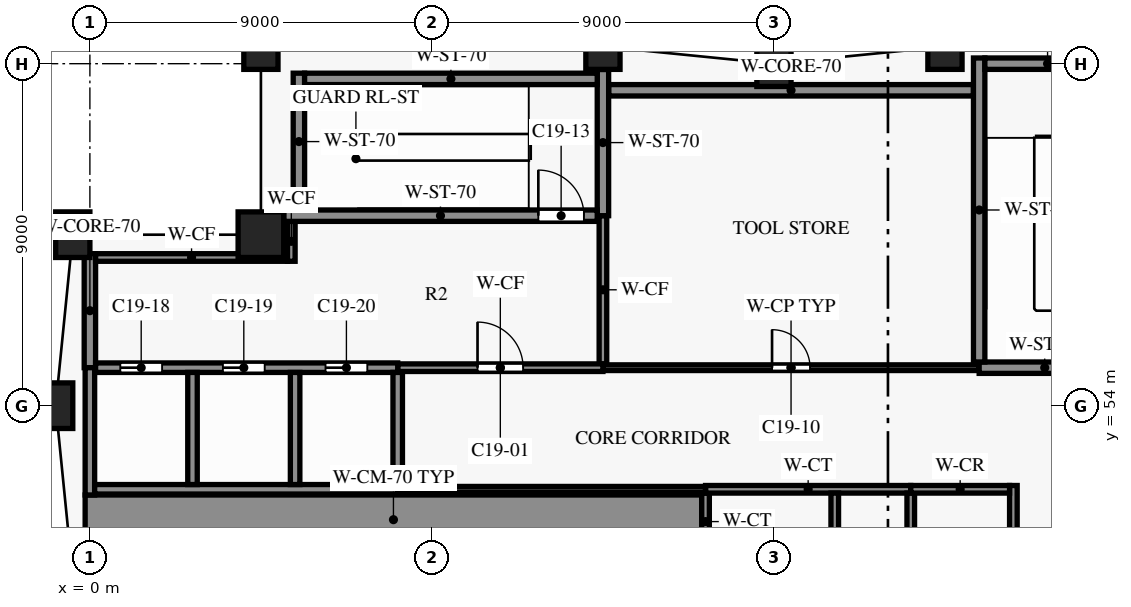
"""IFC4 building model, lengths in metres.
Left out: names, types, materials, properties, quantities, classifications, styles, units other than length and angle.
Written with IfcOpenShell. Run it as: python <this file> out.ifc"""

import sys

from ifc_helpers import new_model, si_unit, direction, frame, frame_2d, origin, origin_2d, place, context, subcontext, project, spatial, rectangle, extrude, element, fill, save


model = new_model("IFC4")
c1 = context("Model", 3, precision=1e-05, world=origin(), true_north=direction((0.0, 1.0)))
c2 = subcontext(c1, "Body", "Model", "MODEL_VIEW")
j1 = project(units=[si_unit("LENGTHUNIT", "METRE"), si_unit("PLANEANGLEUNIT", "RADIAN")], contexts=[c1])
p1 = place(None, origin())
s1 = spatial("IfcSite", under=j1, at=p1, CompositionType="ELEMENT")
p2 = place(p1, origin())
s2 = spatial("IfcBuilding", under=s1, at=p2, CompositionType="ELEMENT")
p3 = place(p2, frame((0.0, 0.0, 137.9)))
s3 = spatial("IfcBuildingStorey", under=s2, at=p3, CompositionType="ELEMENT", Elevation=137.9)
for number, where, z_axis, x_axis in (
    (1, (22.5, 63.45, 0.0), (0.0, 0.0, 1.0), (-0.995, -0.1, 0.0)),
    (2, (18.0, 63.0, 0.0), (0.0, 0.0, 1.0), (-1.0, 0.0, 0.0)),
    (3, (13.5, 63.45, 0.0), (0.0, 0.0, 1.0), (-0.995, 0.1, 0.0)),
    (4, (9.0, 63.9, 0.0), (0.0, 0.0, 1.0), (-1.0, 0.0, 0.0)),
    (5, (4.5, 63.45, 0.0), (0.0, 0.0, 1.0), (-0.995, -0.1, 0.0)),
    (6, (-0.45, 58.5, 0.0), (0.0, 0.0, 1.0), (-0.1, -0.995, 0.0)),
    (7, (-0.9, 54.0, 0.0), (0.0, 0.0, 1.0), (0.0, -1.0, 0.0)),
):
    element("IfcColumn", number, at=place(p3, frame(where, z_axis=z_axis, x_axis=x_axis)), inside=s3, PredefinedType="COLUMN", context=c2, shape_type="SweptSolid", body=[
        extrude(rectangle(XDim=0.9, YDim=1.2, at=origin_2d()), origin(), (0.0, 0.0, 1.0), 5.5),
    ])
p4 = place(p3, frame((4.5, 58.5, 0.0), z_axis=(0.0, 0.0, 1.0), x_axis=(1.0, 0.0, 0.0)))
e8 = element("IfcColumn", 8, at=p4, inside=s3, PredefinedType="COLUMN", context=c2, shape_type="SweptSolid", body=[
    extrude(rectangle(XDim=1.2, YDim=1.2, at=origin_2d()), origin(), (0.0, 0.0, 1.0), 5.5),
])
p5 = place(p3, frame((-0.125, 51.0, 0.0), z_axis=(0.0, 0.0, 1.0), x_axis=(1.0, 0.0, 0.0)))
e9 = element("IfcWall", 9, at=p5, inside=s3, PredefinedType="SHEAR", context=c2, shape_type="SweptSolid", body=[
    extrude(rectangle(XDim=16.225, YDim=1.3, at=frame_2d((8.113, 0.0))), origin(), (0.0, 0.0, 1.0), 5.2),
])
p6 = place(p3, frame((8.1, 51.8, 0.0), z_axis=(0.0, 0.0, 1.0), x_axis=(1.0, 0.0, 0.0)))
e10 = element("IfcWall", 10, at=p6, inside=s3, PredefinedType="PARTITIONING", context=c2, shape_type="SweptSolid", body=[
    extrude(rectangle(XDim=8.1, YDim=0.15, at=frame_2d((4.05, 0.0))), origin(), (0.0, 0.0, 1.0), 5.2),
])
p7 = place(p3, frame((16.2, 51.8, 0.0), z_axis=(0.0, 0.0, 1.0), x_axis=(1.0, 0.0, 0.0)))
e11 = element("IfcWall", 11, at=p7, inside=s3, PredefinedType="PARTITIONING", context=c2, shape_type="SweptSolid", body=[
    extrude(rectangle(XDim=5.4, YDim=0.2, at=frame_2d((2.7, 0.0))), origin(), (0.0, 0.0, 1.0), 5.2),
])
p8 = place(p3, frame((21.6, 51.8, 0.0), z_axis=(0.0, 0.0, 1.0), x_axis=(1.0, 0.0, 0.0)))
e12 = element("IfcWall", 12, at=p8, inside=s3, PredefinedType="PARTITIONING", context=c2, shape_type="SweptSolid", body=[
    extrude(rectangle(XDim=2.6, YDim=0.2, at=frame_2d((1.3, 0.0))), origin(), (0.0, 0.0, 1.0), 5.2),
])
p9 = place(p3, frame((0.125, 51.8, 0.0), z_axis=(0.0, 0.0, 1.0), x_axis=(1.0, 0.0, 0.0)))
e13 = element("IfcWall", 13, at=p9, inside=s3, PredefinedType="SHEAR", context=c2, shape_type="SweptSolid", body=[
    extrude(rectangle(XDim=7.975, YDim=0.25, at=frame_2d((3.988, 0.0))), origin(), (0.0, 0.0, 1.0), 5.2),
])
p10 = place(p3, frame((8.1, 55.0, 0.0), z_axis=(0.0, 0.0, 1.0), x_axis=(1.0, 0.0, 0.0)))
e14 = element("IfcWall", 14, at=p10, inside=s3, PredefinedType="PARTITIONING", context=c2, shape_type="SweptSolid", body=[
    extrude(rectangle(XDim=5.4, YDim=0.2, at=frame_2d((2.7, 0.0))), origin(), (0.0, 0.0, 1.0), 5.2),
])
p11 = place(p10, frame((2.1, 0.0, 0.0)))
e15 = element("IfcOpeningElement", 15, at=p11, cuts=e14, PredefinedType="OPENING", context=c2, shape_type="SweptSolid", body=[
    extrude(rectangle(XDim=1.2, YDim=2.2, at=frame_2d((0.6, 1.1))), frame((0.0, 0.11, 0.0), z_axis=(0.0, -1.0, 0.0), x_axis=(1.0, 0.0, 0.0)), (0.0, 0.0, 1.0), 0.22),
])
p12 = place(p3, frame((13.5, 55.0, 0.0), z_axis=(0.0, 0.0, 1.0), x_axis=(1.0, 0.0, 0.0)))
e16 = element("IfcWall", 16, at=p12, inside=s3, PredefinedType="PARTITIONING", context=c2, shape_type="SweptSolid", body=[
    extrude(rectangle(XDim=9.9, YDim=0.15, at=frame_2d((4.95, 0.0))), origin(), (0.0, 0.0, 1.0), 5.2),
])
p13 = place(p12, frame((4.45, 0.0, 0.0)))
e17 = element("IfcOpeningElement", 17, at=p13, cuts=e16, PredefinedType="OPENING", context=c2, shape_type="SweptSolid", body=[
    extrude(rectangle(XDim=1.0, YDim=2.1, at=frame_2d((0.5, 1.05))), frame((0.0, 0.085, 0.0), z_axis=(0.0, -1.0, 0.0), x_axis=(1.0, 0.0, 0.0)), (0.0, 0.0, 1.0), 0.17),
])
p14 = place(p3, frame((0.15, 55.0, 0.0), z_axis=(0.0, 0.0, 1.0), x_axis=(1.0, 0.0, 0.0)))
e18 = element("IfcWall", 18, at=p14, inside=s3, PredefinedType="SHEAR", context=c2, shape_type="SweptSolid", body=[
    extrude(rectangle(XDim=7.95, YDim=0.25, at=frame_2d((3.975, 0.0))), origin(), (0.0, 0.0, 1.0), 5.2),
])
p15 = place(p14, frame((0.65, 0.0, 0.0)))
e19 = element("IfcOpeningElement", 19, at=p15, cuts=e18, PredefinedType="OPENING", context=c2, shape_type="SweptSolid", body=[
    extrude(rectangle(XDim=1.1, YDim=2.1, at=frame_2d((0.55, 1.05))), frame((0.0, 0.135, 0.0), z_axis=(0.0, -1.0, 0.0), x_axis=(1.0, 0.0, 0.0)), (0.0, 0.0, 1.0), 0.27),
])
p16 = place(p14, frame((3.35, 0.0, 0.0)))
e20 = element("IfcOpeningElement", 20, at=p16, cuts=e18, PredefinedType="OPENING", context=c2, shape_type="SweptSolid", body=[
    extrude(rectangle(XDim=1.1, YDim=2.1, at=frame_2d((0.55, 1.05))), frame((0.0, 0.135, 0.0), z_axis=(0.0, -1.0, 0.0), x_axis=(1.0, 0.0, 0.0)), (0.0, 0.0, 1.0), 0.27),
])
p17 = place(p14, frame((6.05, 0.0, 0.0)))
e21 = element("IfcOpeningElement", 21, at=p17, cuts=e18, PredefinedType="OPENING", context=c2, shape_type="SweptSolid", body=[
    extrude(rectangle(XDim=1.1, YDim=2.1, at=frame_2d((0.55, 1.05))), frame((0.0, 0.135, 0.0), z_axis=(0.0, -1.0, 0.0), x_axis=(1.0, 0.0, 0.0)), (0.0, 0.0, 1.0), 0.27),
])
p18 = place(p3, frame((23.4, 55.0, 0.0), z_axis=(0.0, 0.0, 1.0), x_axis=(1.0, 0.0, 0.0)))
e22 = element("IfcWall", 22, at=p18, inside=s3, PredefinedType="SHEAR", context=c2, shape_type="SweptSolid", body=[
    extrude(rectangle(XDim=3.45, YDim=0.3, at=frame_2d((1.725, 0.0))), origin(), (0.0, 0.0, 1.0), 5.2),
])
p19 = place(p3, frame((0.15, 57.9, 0.0), z_axis=(0.0, 0.0, 1.0), x_axis=(1.0, 0.0, 0.0)))
e23 = element("IfcWall", 23, at=p19, inside=s3, PredefinedType="PARTITIONING", context=c2, shape_type="SweptSolid", body=[
    extrude(rectangle(XDim=5.05, YDim=0.2, at=frame_2d((2.525, 0.0))), origin(), (0.0, 0.0, 1.0), 5.2),
])
p20 = place(p3, frame((5.1, 59.0, 0.0), z_axis=(0.0, 0.0, 1.0), x_axis=(1.0, 0.0, 0.0)))
e24 = element("IfcWall", 24, at=p20, inside=s3, PredefinedType="SHEAR", context=c2, shape_type="SweptSolid", body=[
    extrude(rectangle(XDim=8.25, YDim=0.3, at=frame_2d((4.125, 0.0))), origin(), (0.0, 0.0, 1.0), 5.2),
])
p21 = place(p20, frame((6.7, 0.0, 0.0)))
e25 = element("IfcOpeningElement", 25, at=p21, cuts=e24, PredefinedType="OPENING", context=c2, shape_type="SweptSolid", body=[
    extrude(rectangle(XDim=1.2, YDim=2.2, at=frame_2d((0.6, 1.1))), frame((0.0, 0.16, 0.0), z_axis=(0.0, -1.0, 0.0), x_axis=(1.0, 0.0, 0.0)), (0.0, 0.0, 1.0), 0.32),
])
p22 = place(p3, frame((13.65, 62.3, 0.0), z_axis=(0.0, 0.0, 1.0), x_axis=(1.0, 0.0, 0.0)))
e26 = element("IfcWall", 26, at=p22, inside=s3, PredefinedType="SHEAR", context=c2, shape_type="SweptSolid", body=[
    extrude(rectangle(XDim=9.6, YDim=0.3, at=frame_2d((4.8, 0.0))), origin(), (0.0, 0.0, 1.0), 5.2),
])
p23 = place(p3, frame((5.65, 62.6, 0.0), z_axis=(0.0, 0.0, 1.0), x_axis=(1.0, 0.0, 0.0)))
e27 = element("IfcWall", 27, at=p23, inside=s3, PredefinedType="SHEAR", context=c2, shape_type="SweptSolid", body=[
    extrude(rectangle(XDim=7.7, YDim=0.3, at=frame_2d((3.85, 0.0))), origin(), (0.0, 0.0, 1.0), 5.2),
])
p24 = place(p3, frame((23.55, 63.0, 0.0), z_axis=(0.0, 0.0, 1.0), x_axis=(1.0, 0.0, 0.0)))
e28 = element("IfcWall", 28, at=p24, inside=s3, PredefinedType="SHEAR", context=c2, shape_type="SweptSolid", body=[
    extrude(rectangle(XDim=3.3, YDim=0.3, at=frame_2d((1.65, 0.0))), origin(), (0.0, 0.0, 1.0), 5.2),
])
p25 = place(p3, frame((0.0, 55.0, 0.0), z_axis=(0.0, 0.0, 1.0), x_axis=(0.0, 1.0, 0.0)))
e29 = element("IfcWall", 29, at=p25, inside=s3, PredefinedType="SHEAR", context=c2, shape_type="SweptSolid", body=[
    extrude(rectangle(XDim=3.0, YDim=0.3, at=frame_2d((1.5, 0.0))), origin(), (0.0, 0.0, 1.0), 5.2),
])
p26 = place(p3, frame((0.0, 51.65, 0.0), z_axis=(0.0, 0.0, 1.0), x_axis=(0.0, 1.0, 0.0)))
e30 = element("IfcWall", 30, at=p26, inside=s3, PredefinedType="SHEAR", context=c2, shape_type="SweptSolid", body=[
    extrude(rectangle(XDim=3.35, YDim=0.25, at=frame_2d((1.675, 0.0))), origin(), (0.0, 0.0, 1.0), 5.2),
])
p27 = place(p3, frame((2.7, 51.925, 0.0), z_axis=(0.0, 0.0, 1.0), x_axis=(0.0, 1.0, 0.0)))
e31 = element("IfcWall", 31, at=p27, inside=s3, PredefinedType="SHEAR", context=c2, shape_type="SweptSolid", body=[
    extrude(rectangle(XDim=2.95, YDim=0.25, at=frame_2d((1.475, 0.0))), origin(), (0.0, 0.0, 1.0), 5.2),
])
p28 = place(p3, frame((5.3, 57.8, 0.0), z_axis=(0.0, 0.0, 1.0), x_axis=(0.0, 1.0, 0.0)))
e32 = element("IfcWall", 32, at=p28, inside=s3, PredefinedType="PARTITIONING", context=c2, shape_type="SweptSolid", body=[
    extrude(rectangle(XDim=1.05, YDim=0.2, at=frame_2d((0.525, 0.0))), origin(), (0.0, 0.0, 1.0), 5.2),
])
p29 = place(p3, frame((5.4, 51.925, 0.0), z_axis=(0.0, 0.0, 1.0), x_axis=(0.0, 1.0, 0.0)))
e33 = element("IfcWall", 33, at=p29, inside=s3, PredefinedType="SHEAR", context=c2, shape_type="SweptSolid", body=[
    extrude(rectangle(XDim=2.95, YDim=0.25, at=frame_2d((1.475, 0.0))), origin(), (0.0, 0.0, 1.0), 5.2),
])
p30 = place(p3, frame((5.5, 59.15, 0.0), z_axis=(0.0, 0.0, 1.0), x_axis=(0.0, 1.0, 0.0)))
e34 = element("IfcWall", 34, at=p30, inside=s3, PredefinedType="SHEAR", context=c2, shape_type="SweptSolid", body=[
    extrude(rectangle(XDim=3.6, YDim=0.3, at=frame_2d((1.8, 0.0))), origin(), (0.0, 0.0, 1.0), 5.2),
])
p31 = place(p3, frame((8.1, 51.925, 0.0), z_axis=(0.0, 0.0, 1.0), x_axis=(0.0, 1.0, 0.0)))
e35 = element("IfcWall", 35, at=p31, inside=s3, PredefinedType="SHEAR", context=c2, shape_type="SweptSolid", body=[
    extrude(rectangle(XDim=2.95, YDim=0.25, at=frame_2d((1.475, 0.0))), origin(), (0.0, 0.0, 1.0), 5.2),
])
p32 = place(p3, frame((13.5, 55.1, 0.0), z_axis=(0.0, 0.0, 1.0), x_axis=(0.0, 1.0, 0.0)))
e36 = element("IfcWall", 36, at=p32, inside=s3, PredefinedType="PARTITIONING", context=c2, shape_type="SweptSolid", body=[
    extrude(rectangle(XDim=3.9, YDim=0.2, at=frame_2d((1.95, 0.0))), origin(), (0.0, 0.0, 1.0), 5.2),
])
p33 = place(p3, frame((13.5, 59.0, 0.0), z_axis=(0.0, 0.0, 1.0), x_axis=(0.0, 1.0, 0.0)))
e37 = element("IfcWall", 37, at=p33, inside=s3, PredefinedType="SHEAR", context=c2, shape_type="SweptSolid", body=[
    extrude(rectangle(XDim=3.847, YDim=0.3, at=frame_2d((1.923, 0.0))), origin(), (0.0, 0.0, 1.0), 5.2),
])
p34 = place(p3, frame((16.2, 50.2, 0.0), z_axis=(0.0, 0.0, 1.0), x_axis=(0.0, 1.0, 0.0)))
e38 = element("IfcWall", 38, at=p34, inside=s3, PredefinedType="PARTITIONING", context=c2, shape_type="SweptSolid", body=[
    extrude(rectangle(XDim=1.5, YDim=0.2, at=frame_2d((0.75, 0.0))), origin(), (0.0, 0.0, 1.0), 5.2),
])
for number, where, z_axis, x_axis in (
    (39, (19.6, 47.1, 0.0), (0.0, 0.0, 1.0), (0.0, 1.0, 0.0)),
    (40, (21.6, 47.1, 0.0), (0.0, 0.0, 1.0), (0.0, 1.0, 0.0)),
):
    element("IfcWall", number, at=place(p3, frame(where, z_axis=z_axis, x_axis=x_axis)), inside=s3, PredefinedType="PARTITIONING", context=c2, shape_type="SweptSolid", body=[
        extrude(rectangle(XDim=4.6, YDim=0.2, at=frame_2d((2.3, 0.0))), origin(), (0.0, 0.0, 1.0), 5.2),
    ])
p35 = place(p3, frame((23.4, 55.15, 0.0), z_axis=(0.0, 0.0, 1.0), x_axis=(0.0, 1.0, 0.0)))
e41 = element("IfcWall", 41, at=p35, inside=s3, PredefinedType="SHEAR", context=c2, shape_type="SweptSolid", body=[
    extrude(rectangle(XDim=8.0, YDim=0.3, at=frame_2d((4.0, 0.0))), origin(), (0.0, 0.0, 1.0), 5.2),
])
p36 = place(p3, frame((24.3, 46.9, 0.0), z_axis=(0.0, 0.0, 1.0), x_axis=(0.0, 1.0, 0.0)))
e42 = element("IfcWall", 42, at=p36, inside=s3, PredefinedType="SHEAR", context=c2, shape_type="SweptSolid", body=[
    extrude(rectangle(XDim=5.0, YDim=0.2, at=frame_2d((2.5, 0.0))), origin(), (0.0, 0.0, 1.0), 5.2),
])
p37 = place(p11, origin())
e43 = element("IfcDoor", 43, at=p37, inside=s3, OperationType="SINGLE_SWING_RIGHT", PredefinedType="DOOR", context=c2, shape_type="SweptSolid", body=[
    extrude(rectangle(XDim=1.2, YDim=2.2, at=frame_2d((0.6, 1.1))), frame((0.0, 0.025, 0.0), z_axis=(0.0, -1.0, 0.0), x_axis=(1.0, 0.0, 0.0)), (0.0, 0.0, 1.0), 0.05),
])
fill(e15, e43)
p38 = place(p13, origin())
e44 = element("IfcDoor", 44, at=p38, inside=s3, OperationType="SINGLE_SWING_LEFT", PredefinedType="DOOR", context=c2, shape_type="SweptSolid", body=[
    extrude(rectangle(XDim=1.0, YDim=2.1, at=frame_2d((0.5, 1.05))), frame((0.0, 0.025, 0.0), z_axis=(0.0, -1.0, 0.0), x_axis=(1.0, 0.0, 0.0)), (0.0, 0.0, 1.0), 0.05),
])
fill(e17, e44)
p39 = place(p21, origin())
e45 = element("IfcDoor", 45, at=p39, inside=s3, OperationType="SINGLE_SWING_RIGHT", PredefinedType="DOOR", context=c2, shape_type="SweptSolid", body=[
    extrude(rectangle(XDim=1.2, YDim=2.2, at=frame_2d((0.6, 1.1))), frame((0.0, 0.025, 0.0), z_axis=(0.0, -1.0, 0.0), x_axis=(1.0, 0.0, 0.0)), (0.0, 0.0, 1.0), 0.05),
])
fill(e25, e45)
p40 = place(p15, origin())
e46 = element("IfcDoor", 46, at=p40, inside=s3, OperationType="DOUBLE_DOOR_SLIDING", PredefinedType="DOOR", context=c2, shape_type="SweptSolid", body=[
    extrude(rectangle(XDim=1.1, YDim=2.1, at=frame_2d((0.55, 1.05))), frame((0.0, 0.025, 0.0), z_axis=(0.0, -1.0, 0.0), x_axis=(1.0, 0.0, 0.0)), (0.0, 0.0, 1.0), 0.05),
])
fill(e19, e46)
p41 = place(p16, origin())
e47 = element("IfcDoor", 47, at=p41, inside=s3, OperationType="DOUBLE_DOOR_SLIDING", PredefinedType="DOOR", context=c2, shape_type="SweptSolid", body=[
    extrude(rectangle(XDim=1.1, YDim=2.1, at=frame_2d((0.55, 1.05))), frame((0.0, 0.025, 0.0), z_axis=(0.0, -1.0, 0.0), x_axis=(1.0, 0.0, 0.0)), (0.0, 0.0, 1.0), 0.05),
])
fill(e20, e47)
p42 = place(p17, origin())
e48 = element("IfcDoor", 48, at=p42, inside=s3, OperationType="DOUBLE_DOOR_SLIDING", PredefinedType="DOOR", context=c2, shape_type="SweptSolid", body=[
    extrude(rectangle(XDim=1.1, YDim=2.1, at=frame_2d((0.55, 1.05))), frame((0.0, 0.025, 0.0), z_axis=(0.0, -1.0, 0.0), x_axis=(1.0, 0.0, 0.0)), (0.0, 0.0, 1.0), 0.05),
])
fill(e21, e48)
save(model, sys.argv[1])
